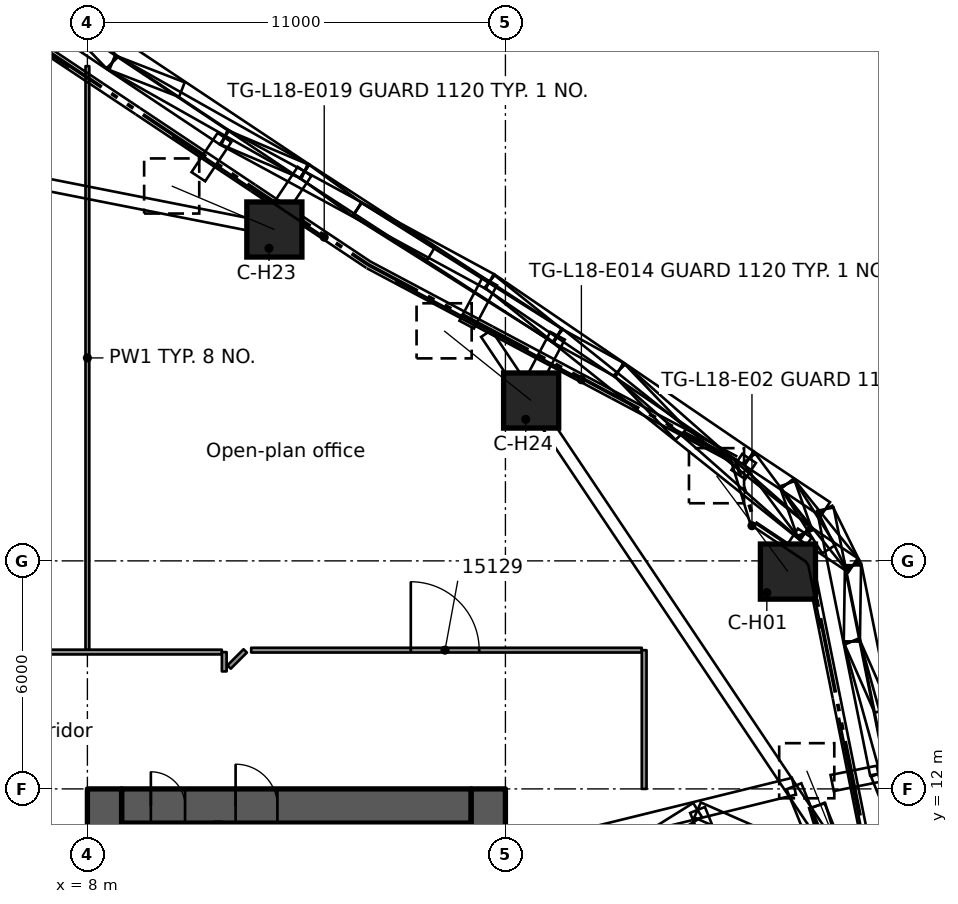
"""IFC4 building model, lengths in metres.
Left out: names, types, materials, properties, quantities, classifications, styles, units other than length and angle.
Written with IfcOpenShell. Run it as: python <this file> out.ifc"""

import sys

from ifc_helpers import new_model, si_unit, direction, frame, frame_2d, origin, origin_2d, place, context, subcontext, project, spatial, rectangle, extrude, element, fill, save


model = new_model("IFC4")
c1 = context("Model", 3, precision=1e-05, world=origin(), true_north=direction((0.0, 1.0)))
c2 = subcontext(c1, "Body", "Model", "MODEL_VIEW")
j1 = project(units=[si_unit("LENGTHUNIT", "METRE"), si_unit("PLANEANGLEUNIT", "RADIAN")], contexts=[c1])
p1 = place(None, origin())
s1 = spatial("IfcSite", under=j1, at=p1, CompositionType="ELEMENT")
p2 = place(p1, origin())
s2 = spatial("IfcBuilding", under=s1, at=p2, CompositionType="ELEMENT")
p3 = place(p2, frame((0.0, 0.0, 76.3)))
s3 = spatial("IfcBuildingStorey", under=s2, at=p3, CompositionType="ELEMENT", Elevation=76.3)
p4 = place(p3, frame((8.9, 11.55, 0.0), z_axis=(0.0, 0.0, 1.0), x_axis=(1.0, 0.0, 0.0)))
e1 = element("IfcWall", 1, at=p4, inside=s3, PredefinedType="SHEAR", context=c2, shape_type="SweptSolid", body=[
    extrude(rectangle(XDim=9.2, YDim=0.9, at=frame_2d((4.6, 0.0))), origin(), (0.0, 0.0, 1.0), 4.4),
])
p5 = place(p4, frame((3.0, 0.0, 0.0)))
e2 = element("IfcOpeningElement", 2, at=p5, cuts=e1, PredefinedType="OPENING", context=c2, shape_type="SweptSolid", body=[
    extrude(rectangle(XDim=1.1, YDim=2.1, at=frame_2d((0.55, 1.05))), frame((0.0, 0.46, 0.0), z_axis=(0.0, -1.0, 0.0), x_axis=(1.0, 0.0, 0.0)), (0.0, 0.0, 1.0), 0.92),
])
p6 = place(p4, frame((0.77, 0.0, 0.0)))
e3 = element("IfcOpeningElement", 3, at=p6, cuts=e1, PredefinedType="OPENING", context=c2, shape_type="SweptSolid", body=[
    extrude(rectangle(XDim=0.9, YDim=2.1, at=frame_2d((0.45, 1.05))), frame((0.0, 0.46, 0.0), z_axis=(0.0, -1.0, 0.0), x_axis=(1.0, 0.0, 0.0)), (0.0, 0.0, 1.0), 0.92),
])
p7 = place(p3, frame((8.45, -12.0, 0.0), z_axis=(0.0, 0.0, 1.0), x_axis=(0.0, 1.0, 0.0)))
e4 = element("IfcWall", 4, at=p7, inside=s3, PredefinedType="SHEAR", context=c2, shape_type="SweptSolid", body=[
    extrude(rectangle(XDim=24.0, YDim=0.9, at=frame_2d((12.0, 0.0))), origin(), (0.0, 0.0, 1.0), 4.4),
])
p8 = place(p7, frame((12.6, 0.0, 0.0)))
e5 = element("IfcOpeningElement", 5, at=p8, cuts=e4, PredefinedType="OPENING", context=c2, shape_type="SweptSolid", body=[
    extrude(rectangle(XDim=1.8, YDim=2.1, at=frame_2d((0.9, 1.05))), frame((0.0, 0.46, 0.0), z_axis=(0.0, -1.0, 0.0), x_axis=(1.0, 0.0, 0.0)), (0.0, 0.0, 1.0), 0.92),
])
p9 = place(p7, frame((16.3, 0.0, 0.0)))
e6 = element("IfcOpeningElement", 6, at=p9, cuts=e4, PredefinedType="OPENING", context=c2, shape_type="SweptSolid", body=[
    extrude(rectangle(XDim=1.8, YDim=2.1, at=frame_2d((0.9, 1.05))), frame((0.0, 0.46, 0.0), z_axis=(0.0, -1.0, 0.0), x_axis=(1.0, 0.0, 0.0)), (0.0, 0.0, 1.0), 0.92),
])
p10 = place(p7, frame((9.6, 0.0, 0.0)))
e7 = element("IfcOpeningElement", 7, at=p10, cuts=e4, PredefinedType="OPENING", context=c2, shape_type="SweptSolid", body=[
    extrude(rectangle(XDim=1.8, YDim=2.1, at=frame_2d((0.9, 1.05))), frame((0.0, 0.46, 0.0), z_axis=(0.0, -1.0, 0.0), x_axis=(1.0, 0.0, 0.0)), (0.0, 0.0, 1.0), 0.92),
])
p11 = place(p7, frame((3.25, 0.0, 0.0)))
e8 = element("IfcOpeningElement", 8, at=p11, cuts=e4, PredefinedType="OPENING", context=c2, shape_type="SweptSolid", body=[
    extrude(rectangle(XDim=1.1, YDim=2.1, at=frame_2d((0.55, 1.05))), frame((0.0, 0.46, 0.0), z_axis=(0.0, -1.0, 0.0), x_axis=(1.0, 0.0, 0.0)), (0.0, 0.0, 1.0), 0.92),
])
p12 = place(p7, frame((21.0, 0.0, 0.0)))
e9 = element("IfcOpeningElement", 9, at=p12, cuts=e4, PredefinedType="OPENING", context=c2, shape_type="SweptSolid", body=[
    extrude(rectangle(XDim=0.8, YDim=2.1, at=frame_2d((0.4, 1.05))), frame((0.0, 0.46, 0.0), z_axis=(0.0, -1.0, 0.0), x_axis=(1.0, 0.0, 0.0)), (0.0, 0.0, 1.0), 0.92),
])
p13 = place(p3, frame((18.55, -12.0, 0.0), z_axis=(0.0, 0.0, 1.0), x_axis=(0.0, 1.0, 0.0)))
e10 = element("IfcWall", 10, at=p13, inside=s3, PredefinedType="SHEAR", context=c2, shape_type="SweptSolid", body=[
    extrude(rectangle(XDim=24.0, YDim=0.9, at=frame_2d((12.0, 0.0))), origin(), (0.0, 0.0, 1.0), 4.4),
])
p14 = place(p13, frame((16.3, 0.0, 0.0)))
e11 = element("IfcOpeningElement", 11, at=p14, cuts=e10, PredefinedType="OPENING", context=c2, shape_type="SweptSolid", body=[
    extrude(rectangle(XDim=1.8, YDim=2.1, at=frame_2d((0.9, 1.05))), frame((0.0, 0.46, 0.0), z_axis=(0.0, -1.0, 0.0), x_axis=(1.0, 0.0, 0.0)), (0.0, 0.0, 1.0), 0.92),
])
p15 = place(p13, frame((12.1, 0.0, 0.0)))
e12 = element("IfcOpeningElement", 12, at=p15, cuts=e10, PredefinedType="OPENING", context=c2, shape_type="SweptSolid", body=[
    extrude(rectangle(XDim=1.8, YDim=2.1, at=frame_2d((0.9, 1.05))), frame((0.0, 0.46, 0.0), z_axis=(0.0, -1.0, 0.0), x_axis=(1.0, 0.0, 0.0)), (0.0, 0.0, 1.0), 0.92),
])
p16 = place(p13, frame((7.9, 0.0, 0.0)))
e13 = element("IfcOpeningElement", 13, at=p16, cuts=e10, PredefinedType="OPENING", context=c2, shape_type="SweptSolid", body=[
    extrude(rectangle(XDim=1.8, YDim=2.1, at=frame_2d((0.9, 1.05))), frame((0.0, 0.46, 0.0), z_axis=(0.0, -1.0, 0.0), x_axis=(1.0, 0.0, 0.0)), (0.0, 0.0, 1.0), 0.92),
])
p17 = place(p3, frame((26.434, 17.718, 0.491), z_axis=(-0.404525579295, 0.5431164527, 0.735787723805), x_axis=(-0.801988529127, -0.597339433781, 0.0)))
e14 = element("IfcColumn", 14, at=p17, inside=s3, PredefinedType="COLUMN", context=c2, shape_type="SweptSolid", body=[
    extrude(rectangle(XDim=1.45, YDim=1.45, at=origin_2d()), origin(), (0.0, 0.0, 1.0), 4.645),
])
p18 = place(p3, frame((28.029, 9.758, 0.469), z_axis=(-0.242399975133, 0.599329365947, 0.762919761947), x_axis=(-0.927046689542, -0.374945909979, 0.0)))
e15 = element("IfcColumn", 15, at=p18, inside=s3, PredefinedType="COLUMN", context=c2, shape_type="SweptSolid", body=[
    extrude(rectangle(XDim=1.45, YDim=1.45, at=origin_2d()), origin(), (0.0, 0.0, 1.0), 4.538),
])
p19 = place(p3, frame((12.92, 26.719, 0.469), z_axis=(-0.595306617304, 0.252280476656, 0.762866038366), x_axis=(-0.390190875101, -0.920733990351, 0.0)))
e16 = element("IfcColumn", 16, at=p19, inside=s3, PredefinedType="COLUMN", context=c2, shape_type="SweptSolid", body=[
    extrude(rectangle(XDim=1.45, YDim=1.45, at=origin_2d()), origin(), (0.0, 0.0, 1.0), 4.539),
])
p20 = place(p3, frame((19.677, 22.219, 0.469), z_axis=(-0.504604790097, 0.404114198636, 0.762932316967), x_axis=(-0.625100883358, -0.780543967772, 0.0)))
e17 = element("IfcColumn", 17, at=p20, inside=s3, PredefinedType="COLUMN", context=c2, shape_type="SweptSolid", body=[
    extrude(rectangle(XDim=1.45, YDim=1.45, at=origin_2d()), origin(), (0.0, 0.0, 1.0), 4.538),
])
p21 = place(p3, frame((11.44, 11.1, 0.0), z_axis=(0.0, 0.0, 1.0), x_axis=(0.0, -1.0, 0.0)))
e18 = element("IfcWall", 18, at=p21, inside=s3, PredefinedType="SOLIDWALL", context=c2, shape_type="SweptSolid", body=[
    extrude(rectangle(XDim=4.125, YDim=0.2, at=frame_2d((2.062, 0.0))), origin(), (0.0, 0.0, 1.0), 3.99),
])
p22 = place(p3, frame((4.412, 15.601, 0.0), z_axis=(0.0, 0.0, 1.0), x_axis=(1.0, 0.0, 0.0)))
e19 = element("IfcWall", 19, at=p22, inside=s3, PredefinedType="PARTITIONING", context=c2, shape_type="SweptSolid", body=[
    extrude(rectangle(XDim=7.125, YDim=0.125, at=frame_2d((3.562, 0.0))), origin(), (0.0, 0.0, 1.0), 3.98),
])
p23 = place(p3, frame((12.311, 15.651, 0.0), z_axis=(0.0, 0.0, 1.0), x_axis=(1.0, 0.0, 0.0)))
e20 = element("IfcWall", 20, at=p23, inside=s3, PredefinedType="PARTITIONING", context=c2, shape_type="SweptSolid", body=[
    extrude(rectangle(XDim=10.276, YDim=0.125, at=frame_2d((5.138, 0.0))), origin(), (0.0, 0.0, 1.0), 3.98),
])
p24 = place(p23, frame((4.199, 0.0, 0.0)))
e21 = element("IfcOpeningElement", 21, at=p24, cuts=e20, PredefinedType="OPENING", context=c2, shape_type="SweptSolid", body=[
    extrude(rectangle(XDim=1.8, YDim=2.1, at=frame_2d((0.9, 1.05))), frame((0.0, 0.073, 0.0), z_axis=(0.0, -1.0, 0.0), x_axis=(1.0, 0.0, 0.0)), (0.0, 0.0, 1.0), 0.145),
])
p25 = place(p3, frame((11.729, 15.207, 0.0), z_axis=(0.0, 0.0, 1.0), x_axis=(0.707106781187, 0.707106781187, 0.0)))
e22 = element("IfcWall", 22, at=p25, inside=s3, PredefinedType="PARTITIONING", context=c2, shape_type="SweptSolid", body=[
    extrude(rectangle(XDim=0.6, YDim=0.125, at=frame_2d((0.3, 0.0))), origin(), (0.0, 0.0, 1.0), 3.98),
])
p26 = place(p3, frame((22.651, 12.0, 0.0), z_axis=(0.0, 0.0, 1.0), x_axis=(0.0, 1.0, 0.0)))
e23 = element("IfcWall", 23, at=p26, inside=s3, PredefinedType="PARTITIONING", context=c2, shape_type="SweptSolid", body=[
    extrude(rectangle(XDim=3.65, YDim=0.125, at=frame_2d((1.825, 0.0))), origin(), (0.0, 0.0, 1.0), 3.98),
])
p27 = place(p3, frame((11.601, 15.092, 0.0), z_axis=(0.0, 0.0, 1.0), x_axis=(0.0, 1.0, 0.0)))
e24 = element("IfcWall", 24, at=p27, inside=s3, PredefinedType="PARTITIONING", context=c2, shape_type="SweptSolid", body=[
    extrude(rectangle(XDim=0.508, YDim=0.125, at=frame_2d((0.254, 0.0))), origin(), (0.0, 0.0, 1.0), 3.98),
])
p28 = place(p3, frame((8.0, 15.664, 0.0), z_axis=(0.0, 0.0, 1.0), x_axis=(0.0, 1.0, 0.0)))
e25 = element("IfcWall", 25, at=p28, inside=s3, PredefinedType="PARTITIONING", context=c2, shape_type="SweptSolid", body=[
    extrude(rectangle(XDim=15.353, YDim=0.1, at=frame_2d((7.677, 0.0))), origin(), (0.0, 0.0, 1.0), 3.98),
])
p29 = place(p5, origin())
e26 = element("IfcDoor", 26, at=p29, inside=s3, OperationType="SINGLE_SWING_LEFT", PredefinedType="DOOR", context=c2, shape_type="SweptSolid", body=[
    extrude(rectangle(XDim=1.1, YDim=2.1, at=frame_2d((0.55, 1.05))), frame((0.0, 0.025, 0.0), z_axis=(0.0, -1.0, 0.0), x_axis=(1.0, 0.0, 0.0)), (0.0, 0.0, 1.0), 0.05),
])
fill(e2, e26)
p30 = place(p6, origin())
e27 = element("IfcDoor", 27, at=p30, inside=s3, OperationType="SINGLE_SWING_LEFT", PredefinedType="DOOR", context=c2, shape_type="SweptSolid", body=[
    extrude(rectangle(XDim=0.9, YDim=2.1, at=frame_2d((0.45, 1.05))), frame((0.0, 0.025, 0.0), z_axis=(0.0, -1.0, 0.0), x_axis=(1.0, 0.0, 0.0)), (0.0, 0.0, 1.0), 0.05),
])
fill(e3, e27)
p31 = place(p24, origin())
e28 = element("IfcDoor", 28, at=p31, inside=s3, OperationType="DOUBLE_DOOR_SINGLE_SWING", PredefinedType="DOOR", context=c2, shape_type="SweptSolid", body=[
    extrude(rectangle(XDim=1.8, YDim=2.1, at=frame_2d((0.9, 1.05))), frame((0.0, 0.025, 0.0), z_axis=(0.0, -1.0, 0.0), x_axis=(1.0, 0.0, 0.0)), (0.0, 0.0, 1.0), 0.05),
])
fill(e21, e28)
save(model, sys.argv[1])
